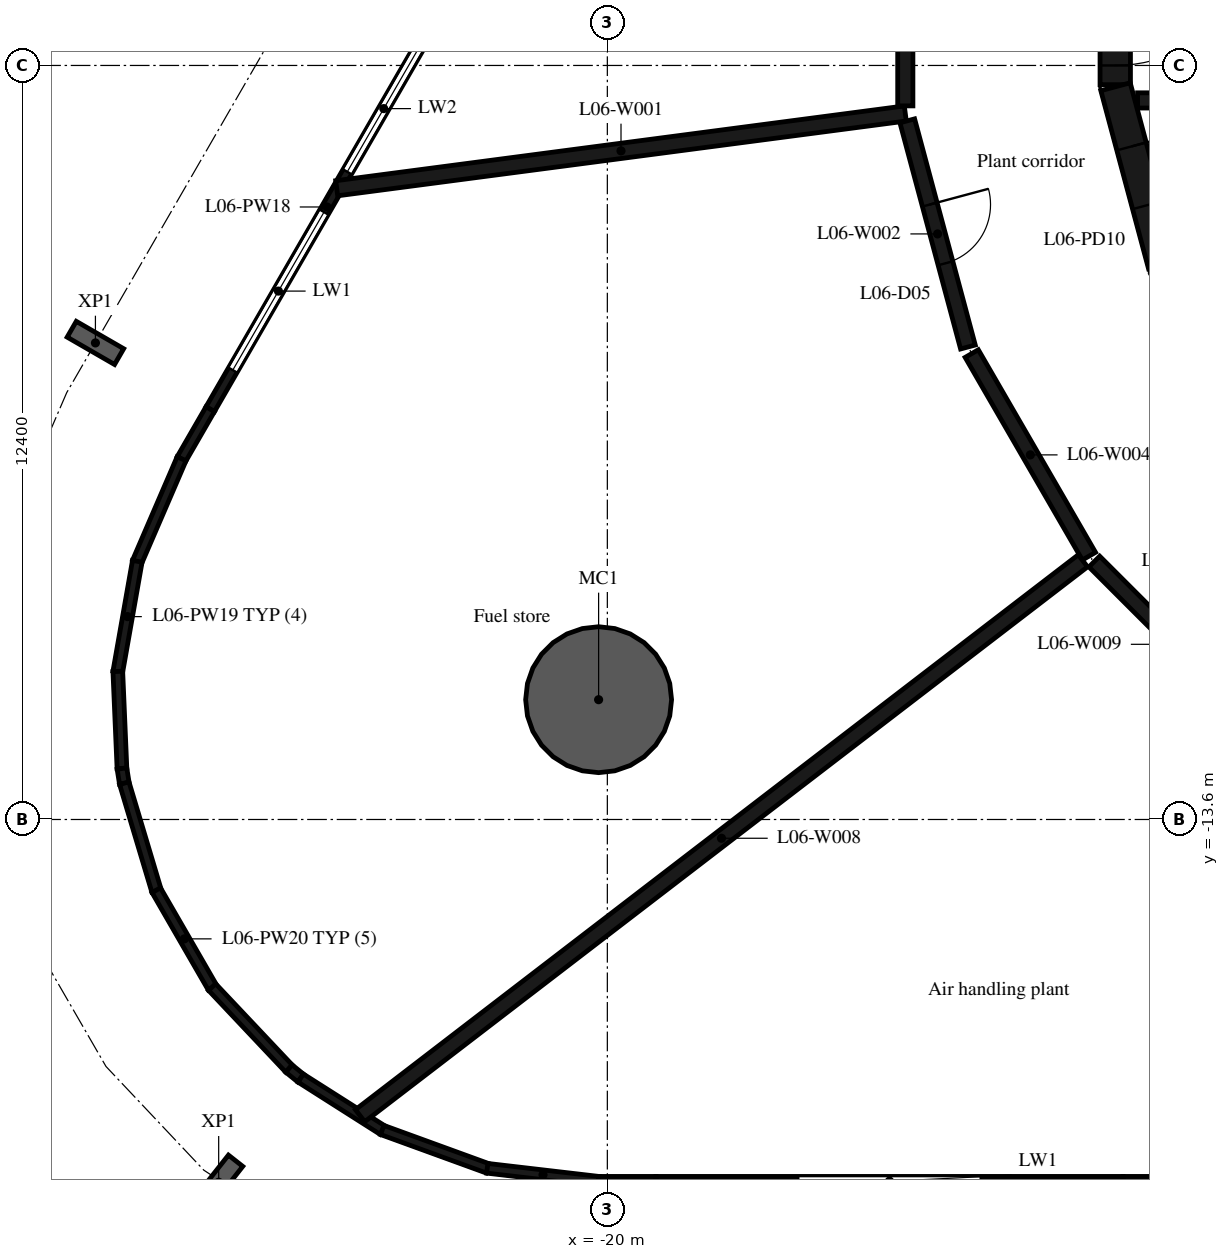
"""IFC4 building model, lengths in metres.
Left out: names, types, materials, properties, quantities, classifications, styles, units other than length and angle.
Written with IfcOpenShell. Run it as: python <this file> out.ifc"""

import sys

from ifc_helpers import new_model, si_unit, direction, frame, frame_2d, origin, origin_2d, place, context, subcontext, project, spatial, rectangle, hollow_circle, i_section, extrude, element, fill, save


model = new_model("IFC4")
c1 = context("Model", 3, precision=1e-05, world=origin(), true_north=direction((0.0, 1.0)))
c2 = subcontext(c1, "Body", "Model", "MODEL_VIEW")
j1 = project(units=[si_unit("LENGTHUNIT", "METRE"), si_unit("PLANEANGLEUNIT", "RADIAN")], contexts=[c1])
p1 = place(None, origin())
s1 = spatial("IfcSite", under=j1, at=p1, CompositionType="ELEMENT")
p2 = place(p1, origin())
s2 = spatial("IfcBuilding", under=s1, at=p2, CompositionType="ELEMENT")
p3 = place(p2, frame((0.0, 0.0, 33.0)))
s3 = spatial("IfcBuildingStorey", under=s2, at=p3, CompositionType="ELEMENT", Elevation=33.0)
p4 = place(p3, frame((-20.144, -11.63, -0.45), z_axis=(0.0, 0.0, 1.0), x_axis=(1.0, 0.0, 0.0)))
e1 = element("IfcColumn", 1, at=p4, inside=s3, PredefinedType="COLUMN", context=c2, shape_type="SweptSolid", body=[
    extrude(hollow_circle(Radius=1.2, WallThickness=0.06, at=origin_2d()), origin(), (0.0, 0.0, 1.0), 5.4),
])
for number, where, z_axis, x_axis in (
    (2, (-28.419, -5.763, -0.45), (0.0, 0.0, 1.0), (0.5, 0.866, 0.0)),
    (3, (-26.392, -19.565, -0.45), (0.0, 0.0, 1.0), (-0.786, 0.619, 0.0)),
):
    element("IfcColumn", number, at=place(p3, frame(where, z_axis=z_axis, x_axis=x_axis)), inside=s3, PredefinedType="COLUMN", context=c2, shape_type="SweptSolid", body=[
        extrude(i_section(OverallWidth=0.3, OverallDepth=0.9, WebThickness=0.019, FlangeThickness=0.035, FilletRadius=0.03, at=origin_2d()), origin(), (0.0, 0.0, 1.0), 5.4),
    ])
p5 = place(p3, frame((-22.691, -0.202, 0.0), z_axis=(0.0, 0.0, 1.0), x_axis=(-0.500005879718, -0.866022009101, 0.0)))
e4 = element("IfcWall", 4, at=p5, inside=s3, PredefinedType="STANDARD", context=c2, shape_type="SweptSolid", body=[
    extrude(rectangle(XDim=7.68, YDim=0.16, at=frame_2d((3.84, 0.0))), origin(), (0.0, 0.0, 1.0), 4.95),
])
p6 = place(p5, frame((0.772, 0.0, 1.0)))
e5 = element("IfcOpeningElement", 5, at=p6, cuts=e4, PredefinedType="OPENING", context=c2, shape_type="SweptSolid", body=[
    extrude(rectangle(XDim=2.4, YDim=2.2, at=frame_2d((1.2, 1.1))), frame((0.0, 0.09, 0.0), z_axis=(0.0, -1.0, 0.0), x_axis=(1.0, 0.0, 0.0)), (0.0, 0.0, 1.0), 0.18),
])
p7 = place(p5, frame((3.937, 0.0, 1.0)))
e6 = element("IfcOpeningElement", 6, at=p7, cuts=e4, PredefinedType="OPENING", context=c2, shape_type="SweptSolid", body=[
    extrude(rectangle(XDim=3.0, YDim=2.2, at=frame_2d((1.5, 1.1))), frame((0.0, 0.09, 0.0), z_axis=(0.0, -1.0, 0.0), x_axis=(1.0, 0.0, 0.0)), (0.0, 0.0, 1.0), 0.18),
])
p8 = place(p3, frame((-26.531, -6.853, 0.0), z_axis=(0.0, 0.0, 1.0), x_axis=(-0.499998034377, -0.866026538634, 0.0)))
e7 = element("IfcWall", 7, at=p8, inside=s3, PredefinedType="STANDARD", context=c2, shape_type="SweptSolid", body=[
    extrude(rectangle(XDim=0.946, YDim=0.16, at=frame_2d((0.473, 0.0))), origin(), (0.0, 0.0, 1.0), 4.95),
])
p9 = place(p3, frame((-27.002, -7.668, 0.0), z_axis=(0.0, 0.0, 1.0), x_axis=(-0.395977414549, -0.918260250238, 0.0)))
e8 = element("IfcWall", 8, at=p9, inside=s3, PredefinedType="STANDARD", context=c2, shape_type="SweptSolid", body=[
    extrude(rectangle(XDim=1.846, YDim=0.16, at=frame_2d((0.923, 0.0))), origin(), (0.0, 0.0, 1.0), 4.95),
])
p10 = place(p3, frame((-27.73, -9.354, 0.0), z_axis=(0.0, 0.0, 1.0), x_axis=(-0.173732575917, -0.984792867595, 0.0)))
e9 = element("IfcWall", 9, at=p10, inside=s3, PredefinedType="STANDARD", context=c2, shape_type="SweptSolid", body=[
    extrude(rectangle(XDim=1.848, YDim=0.16, at=frame_2d((0.924, 0.0))), origin(), (0.0, 0.0, 1.0), 4.95),
])
p11 = place(p3, frame((-28.05, -11.165, 0.0), z_axis=(0.0, 0.0, 1.0), x_axis=(0.042469293695, -0.999097772539, 0.0)))
e10 = element("IfcWall", 10, at=p11, inside=s3, PredefinedType="STANDARD", context=c2, shape_type="SweptSolid", body=[
    extrude(rectangle(XDim=1.598, YDim=0.16, at=frame_2d((0.799, 0.0))), origin(), (0.0, 0.0, 1.0), 4.95),
])
p12 = place(p3, frame((-27.982, -12.762, 0.0), z_axis=(0.0, 0.0, 1.0), x_axis=(0.158678095384, -0.987330371277, 0.0)))
e11 = element("IfcWall", 11, at=p12, inside=s3, PredefinedType="STANDARD", context=c2, shape_type="SweptSolid", body=[
    extrude(rectangle(XDim=0.249, YDim=0.16, at=frame_2d((0.125, 0.0))), origin(), (0.0, 0.0, 1.0), 4.95),
])
p13 = place(p3, frame((-27.944, -13.003, 0.0), z_axis=(0.0, 0.0, 1.0), x_axis=(0.286838279013, -0.957979019443, 0.0)))
e12 = element("IfcWall", 12, at=p13, inside=s3, PredefinedType="STANDARD", context=c2, shape_type="SweptSolid", body=[
    extrude(rectangle(XDim=1.846, YDim=0.16, at=frame_2d((0.923, 0.0))), origin(), (0.0, 0.0, 1.0), 4.95),
])
p14 = place(p3, frame((-27.418, -14.763, 0.0), z_axis=(0.0, 0.0, 1.0), x_axis=(0.499932070267, -0.866064619482, 0.0)))
e13 = element("IfcWall", 13, at=p14, inside=s3, PredefinedType="STANDARD", context=c2, shape_type="SweptSolid", body=[
    extrude(rectangle(XDim=1.848, YDim=0.16, at=frame_2d((0.924, 0.0))), origin(), (0.0, 0.0, 1.0), 4.95),
])
p15 = place(p3, frame((-26.5, -16.356, 0.0), z_axis=(0.0, 0.0, 1.0), x_axis=(0.686176861491, -0.727434749482, 0.0)))
e14 = element("IfcWall", 14, at=p15, inside=s3, PredefinedType="STANDARD", context=c2, shape_type="SweptSolid", body=[
    extrude(rectangle(XDim=1.846, YDim=0.16, at=frame_2d((0.923, 0.0))), origin(), (0.0, 0.0, 1.0), 4.95),
])
p16 = place(p3, frame((-25.237, -17.695, 0.0), z_axis=(0.0, 0.0, 1.0), x_axis=(0.775874220568, -0.630887623795, 0.0)))
e15 = element("IfcWall", 15, at=p16, inside=s3, PredefinedType="STANDARD", context=c2, shape_type="SweptSolid", body=[
    extrude(rectangle(XDim=0.249, YDim=0.16, at=frame_2d((0.125, 0.0))), origin(), (0.0, 0.0, 1.0), 4.95),
])
p17 = place(p3, frame((-25.043, -17.853, 0.0), z_axis=(0.0, 0.0, 1.0), x_axis=(0.844000986035, -0.536341622076, 0.0)))
e16 = element("IfcWall", 16, at=p17, inside=s3, PredefinedType="STANDARD", context=c2, shape_type="SweptSolid", body=[
    extrude(rectangle(XDim=1.598, YDim=0.16, at=frame_2d((0.799, 0.0))), origin(), (0.0, 0.0, 1.0), 4.95),
])
p18 = place(p3, frame((-23.702, -18.706, 0.0), z_axis=(0.0, 0.0, 1.0), x_axis=(0.939716242701, -0.341955235673, 0.0)))
e17 = element("IfcWall", 17, at=p18, inside=s3, PredefinedType="STANDARD", context=c2, shape_type="SweptSolid", body=[
    extrude(rectangle(XDim=1.848, YDim=0.16, at=frame_2d((0.924, 0.0))), origin(), (0.0, 0.0, 1.0), 4.95),
])
p19 = place(p3, frame((-21.975, -19.336, 0.0), z_axis=(0.0, 0.0, 1.0), x_axis=(0.993233418606, -0.116135163342, 0.0)))
e18 = element("IfcWall", 18, at=p19, inside=s3, PredefinedType="STANDARD", context=c2, shape_type="SweptSolid", body=[
    extrude(rectangle(XDim=1.846, YDim=0.16, at=frame_2d((0.923, 0.0))), origin(), (0.0, 0.0, 1.0), 4.95),
])
p20 = place(p3, frame((-20.146, -19.55, 0.0), z_axis=(0.0, 0.0, 1.0), x_axis=(1.0, 0.0, 0.0)))
e19 = element("IfcWall", 19, at=p20, inside=s3, PredefinedType="STANDARD", context=c2, shape_type="SweptSolid", body=[
    extrude(rectangle(XDim=0.946, YDim=0.16, at=frame_2d((0.473, 0.0))), origin(), (0.0, 0.0, 1.0), 4.95),
])
p21 = place(p3, frame((-19.2, -19.55, 0.0), z_axis=(0.0, 0.0, 1.0), x_axis=(1.0, 0.0, 0.0)))
e20 = element("IfcWall", 20, at=p21, inside=s3, PredefinedType="STANDARD", context=c2, shape_type="SweptSolid", body=[
    extrude(rectangle(XDim=7.68, YDim=0.16, at=frame_2d((3.84, 0.0))), origin(), (0.0, 0.0, 1.0), 4.95),
])
p22 = place(p21, frame((2.34, 0.0, 1.0)))
e21 = element("IfcOpeningElement", 21, at=p22, cuts=e20, PredefinedType="OPENING", context=c2, shape_type="SweptSolid", body=[
    extrude(rectangle(XDim=3.0, YDim=2.2, at=frame_2d((1.5, 1.1))), frame((0.0, 0.09, 0.0), z_axis=(0.0, -1.0, 0.0), x_axis=(1.0, 0.0, 0.0)), (0.0, 0.0, 1.0), 0.18),
])
p23 = place(p3, frame((-11.52, -19.55, 0.0), z_axis=(0.0, 0.0, 1.0), x_axis=(1.0, 0.0, 0.0)))
e22 = element("IfcWall", 22, at=p23, inside=s3, PredefinedType="STANDARD", context=c2, shape_type="SweptSolid", body=[
    extrude(rectangle(XDim=7.68, YDim=0.16, at=frame_2d((3.84, 0.0))), origin(), (0.0, 0.0, 1.0), 4.95),
])
p24 = place(p23, frame((0.998, 0.0, 1.0)))
e23 = element("IfcOpeningElement", 23, at=p24, cuts=e22, PredefinedType="OPENING", context=c2, shape_type="SweptSolid", body=[
    extrude(rectangle(XDim=3.0, YDim=2.2, at=frame_2d((1.5, 1.1))), frame((0.0, 0.09, 0.0), z_axis=(0.0, -1.0, 0.0), x_axis=(1.0, 0.0, 0.0)), (0.0, 0.0, 1.0), 0.18),
])
p25 = place(p23, frame((5.062, 0.0, 1.0)))
e24 = element("IfcOpeningElement", 24, at=p25, cuts=e22, PredefinedType="OPENING", context=c2, shape_type="SweptSolid", body=[
    extrude(rectangle(XDim=1.8, YDim=2.2, at=frame_2d((0.9, 1.1))), frame((0.0, 0.09, 0.0), z_axis=(0.0, -1.0, 0.0), x_axis=(1.0, 0.0, 0.0)), (0.0, 0.0, 1.0), 0.18),
])
p26 = place(p3, frame((-11.647, 1.516, 0.0), z_axis=(0.0, 0.0, 1.0), x_axis=(0.0, -1.0, 0.0)))
e25 = element("IfcWall", 25, at=p26, inside=s3, PredefinedType="SHEAR", context=c2, shape_type="SweptSolid", body=[
    extrude(rectangle(XDim=3.033, YDim=0.5, at=frame_2d((1.516, 0.0))), origin(), (0.0, 0.0, 1.0), 4.95),
])
p27 = place(p26, frame((0.316, 0.0, 0.0)))
e26 = element("IfcOpeningElement", 26, at=p27, cuts=e25, PredefinedType="OPENING", context=c2, shape_type="SweptSolid", body=[
    extrude(rectangle(XDim=2.4, YDim=2.1, at=frame_2d((1.2, 1.05))), frame((0.0, 0.26, 0.0), z_axis=(0.0, -1.0, 0.0), x_axis=(1.0, 0.0, 0.0)), (0.0, 0.0, 1.0), 0.52),
])
p28 = place(p3, frame((-11.643, -1.55, 0.0), z_axis=(0.0, 0.0, 1.0), x_axis=(0.258734743916, -0.965948410781, 0.0)))
e27 = element("IfcWall", 27, at=p28, inside=s3, PredefinedType="SHEAR", context=c2, shape_type="SweptSolid", body=[
    extrude(rectangle(XDim=3.033, YDim=0.5, at=frame_2d((1.516, 0.0))), origin(), (0.0, 0.0, 1.0), 4.95),
])
p29 = place(p28, frame((1.016, 0.0, 0.0)))
e28 = element("IfcOpeningElement", 28, at=p29, cuts=e27, PredefinedType="OPENING", context=c2, shape_type="SweptSolid", body=[
    extrude(rectangle(XDim=1.0, YDim=2.4, at=frame_2d((0.5, 1.2))), frame((0.0, 0.26, 0.0), z_axis=(0.0, -1.0, 0.0), x_axis=(1.0, 0.0, 0.0)), (0.0, 0.0, 1.0), 0.52),
])
p30 = place(p3, frame((-11.28, -1.775, 0.0), z_axis=(0.0, 0.0, 1.0), x_axis=(1.0, 0.0, 0.0)))
e29 = element("IfcWall", 29, at=p30, inside=s3, PredefinedType="SHEAR", context=c2, shape_type="SweptSolid", body=[
    extrude(rectangle(XDim=14.38, YDim=0.25, at=frame_2d((7.19, 0.0))), origin(), (0.0, 0.0, 1.0), 4.95),
])
p31 = place(p30, frame((7.555, 0.0, 0.0)))
e30 = element("IfcOpeningElement", 30, at=p31, cuts=e29, PredefinedType="OPENING", context=c2, shape_type="SweptSolid", body=[
    extrude(rectangle(XDim=1.0, YDim=2.4, at=frame_2d((0.5, 1.2))), frame((0.0, 0.135, 0.0), z_axis=(0.0, -1.0, 0.0), x_axis=(1.0, 0.0, 0.0)), (0.0, 0.0, 1.0), 0.27),
])
p32 = place(p30, frame((10.78, 0.0, 0.0)))
e31 = element("IfcOpeningElement", 31, at=p32, cuts=e29, PredefinedType="OPENING", context=c2, shape_type="SweptSolid", body=[
    extrude(rectangle(XDim=1.0, YDim=2.4, at=frame_2d((0.5, 1.2))), frame((0.0, 0.135, 0.0), z_axis=(0.0, -1.0, 0.0), x_axis=(1.0, 0.0, 0.0)), (0.0, 0.0, 1.0), 0.27),
])
p33 = place(p30, frame((12.93, 0.0, 0.0)))
e32 = element("IfcOpeningElement", 32, at=p33, cuts=e29, PredefinedType="OPENING", context=c2, shape_type="SweptSolid", body=[
    extrude(rectangle(XDim=1.0, YDim=2.4, at=frame_2d((0.5, 1.2))), frame((0.0, 0.135, 0.0), z_axis=(0.0, -1.0, 0.0), x_axis=(1.0, 0.0, 0.0)), (0.0, 0.0, 1.0), 0.27),
])
p34 = place(p3, frame((-15.1, -1.99, 0.0), z_axis=(0.0, 0.0, 1.0), x_axis=(-0.991465922176, -0.130366119689, 0.0)))
e33 = element("IfcWall", 33, at=p34, inside=s3, PredefinedType="PARTITIONING", context=c2, shape_type="SweptSolid", body=[
    extrude(rectangle(XDim=9.431, YDim=0.25, at=frame_2d((4.716, 0.0))), origin(), (0.0, 0.0, 1.0), 4.95),
])
p35 = place(p3, frame((-15.068, -2.111, 0.0), z_axis=(0.0, 0.0, 1.0), x_axis=(0.259059323171, -0.965861411942, 0.0)))
e34 = element("IfcWall", 34, at=p35, inside=s3, PredefinedType="PARTITIONING", context=c2, shape_type="SweptSolid", body=[
    extrude(rectangle(XDim=3.851, YDim=0.25, at=frame_2d((1.925, 0.0))), origin(), (0.0, 0.0, 1.0), 4.95),
])
p36 = place(p35, frame((1.425, 0.0, 0.0)))
e35 = element("IfcOpeningElement", 35, at=p36, cuts=e34, PredefinedType="OPENING", context=c2, shape_type="SweptSolid", body=[
    extrude(rectangle(XDim=1.0, YDim=2.1, at=frame_2d((0.5, 1.05))), frame((0.0, 0.135, 0.0), z_axis=(0.0, -1.0, 0.0), x_axis=(1.0, 0.0, 0.0)), (0.0, 0.0, 1.0), 0.27),
])
p37 = place(p3, frame((-15.1, 1.99, 0.0), z_axis=(0.0, 0.0, 1.0), x_axis=(0.0, -1.0, 0.0)))
e36 = element("IfcWall", 36, at=p37, inside=s3, PredefinedType="PARTITIONING", context=c2, shape_type="SweptSolid", body=[
    extrude(rectangle(XDim=3.855, YDim=0.25, at=frame_2d((1.927, 0.0))), origin(), (0.0, 0.0, 1.0), 4.95),
])
p38 = place(p37, frame((1.427, 0.0, 0.0)))
e37 = element("IfcOpeningElement", 37, at=p38, cuts=e36, PredefinedType="OPENING", context=c2, shape_type="SweptSolid", body=[
    extrude(rectangle(XDim=1.0, YDim=2.1, at=frame_2d((0.5, 1.05))), frame((0.0, 0.135, 0.0), z_axis=(0.0, -1.0, 0.0), x_axis=(1.0, 0.0, 0.0)), (0.0, 0.0, 1.0), 0.27),
])
p39 = place(p3, frame((-14.007, -5.938, 0.0), z_axis=(0.0, 0.0, 1.0), x_axis=(0.500708693508, -0.865615852585, 0.0)))
e38 = element("IfcWall", 38, at=p39, inside=s3, PredefinedType="PARTITIONING", context=c2, shape_type="SweptSolid", body=[
    extrude(rectangle(XDim=3.849, YDim=0.25, at=frame_2d((1.925, 0.0))), origin(), (0.0, 0.0, 1.0), 4.95),
])
p40 = place(p3, frame((-12.179, -9.346, 0.0), z_axis=(0.0, 0.0, 1.0), x_axis=(-0.793242531183, -0.608905811043, 0.0)))
e39 = element("IfcWall", 39, at=p40, inside=s3, PredefinedType="PARTITIONING", context=c2, shape_type="SweptSolid", body=[
    extrude(rectangle(XDim=14.986, YDim=0.25, at=frame_2d((7.493, 0.0))), origin(), (0.0, 0.0, 1.0), 4.95),
])
p41 = place(p3, frame((-11.992, -9.358, 0.0), z_axis=(0.0, 0.0, 1.0), x_axis=(0.707106781187, -0.707106781187, 0.0)))
e40 = element("IfcWall", 40, at=p41, inside=s3, PredefinedType="PARTITIONING", context=c2, shape_type="SweptSolid", body=[
    extrude(rectangle(XDim=3.849, YDim=0.25, at=frame_2d((1.925, 0.0))), origin(), (0.0, 0.0, 1.0), 4.95),
])
p42 = place(p41, frame((1.425, 0.0, 0.0)))
e41 = element("IfcOpeningElement", 41, at=p42, cuts=e40, PredefinedType="OPENING", context=c2, shape_type="SweptSolid", body=[
    extrude(rectangle(XDim=1.0, YDim=2.1, at=frame_2d((0.5, 1.05))), frame((0.0, 0.135, 0.0), z_axis=(0.0, -1.0, 0.0), x_axis=(1.0, 0.0, 0.0)), (0.0, 0.0, 1.0), 0.27),
])
p43 = place(p6, origin())
e42 = element("IfcWindow", 42, at=p43, inside=s3, PartitioningType="SINGLE_PANEL", PredefinedType="WINDOW", context=c2, shape_type="SweptSolid", body=[
    extrude(rectangle(XDim=2.4, YDim=2.2, at=frame_2d((1.2, 1.1))), frame((0.0, 0.03, 0.0), z_axis=(0.0, -1.0, 0.0), x_axis=(1.0, 0.0, 0.0)), (0.0, 0.0, 1.0), 0.06),
])
fill(e5, e42)
p44 = place(p7, origin())
e43 = element("IfcWindow", 43, at=p44, inside=s3, PartitioningType="SINGLE_PANEL", PredefinedType="WINDOW", context=c2, shape_type="SweptSolid", body=[
    extrude(rectangle(XDim=3.0, YDim=2.2, at=frame_2d((1.5, 1.1))), frame((0.0, 0.03, 0.0), z_axis=(0.0, -1.0, 0.0), x_axis=(1.0, 0.0, 0.0)), (0.0, 0.0, 1.0), 0.06),
])
fill(e6, e43)
p45 = place(p27, origin())
e44 = element("IfcDoor", 44, at=p45, inside=s3, OperationType="DOUBLE_DOOR_SINGLE_SWING", PredefinedType="DOOR", context=c2, shape_type="SweptSolid", body=[
    extrude(rectangle(XDim=2.4, YDim=2.1, at=frame_2d((1.2, 1.05))), frame((0.0, 0.025, 0.0), z_axis=(0.0, -1.0, 0.0), x_axis=(1.0, 0.0, 0.0)), (0.0, 0.0, 1.0), 0.05),
])
fill(e26, e44)
p46 = place(p29, origin())
e45 = element("IfcDoor", 45, at=p46, inside=s3, OperationType="SINGLE_SWING_LEFT", PredefinedType="DOOR", context=c2, shape_type="SweptSolid", body=[
    extrude(rectangle(XDim=1.0, YDim=2.4, at=frame_2d((0.5, 1.2))), frame((0.0, 0.025, 0.0), z_axis=(0.0, -1.0, 0.0), x_axis=(1.0, 0.0, 0.0)), (0.0, 0.0, 1.0), 0.05),
])
fill(e28, e45)
p47 = place(p36, origin())
e46 = element("IfcDoor", 46, at=p47, inside=s3, OperationType="SINGLE_SWING_LEFT", PredefinedType="DOOR", context=c2, shape_type="SweptSolid", body=[
    extrude(rectangle(XDim=1.0, YDim=2.1, at=frame_2d((0.5, 1.05))), frame((0.0, 0.025, 0.0), z_axis=(0.0, -1.0, 0.0), x_axis=(1.0, 0.0, 0.0)), (0.0, 0.0, 1.0), 0.05),
])
fill(e35, e46)
save(model, sys.argv[1])
